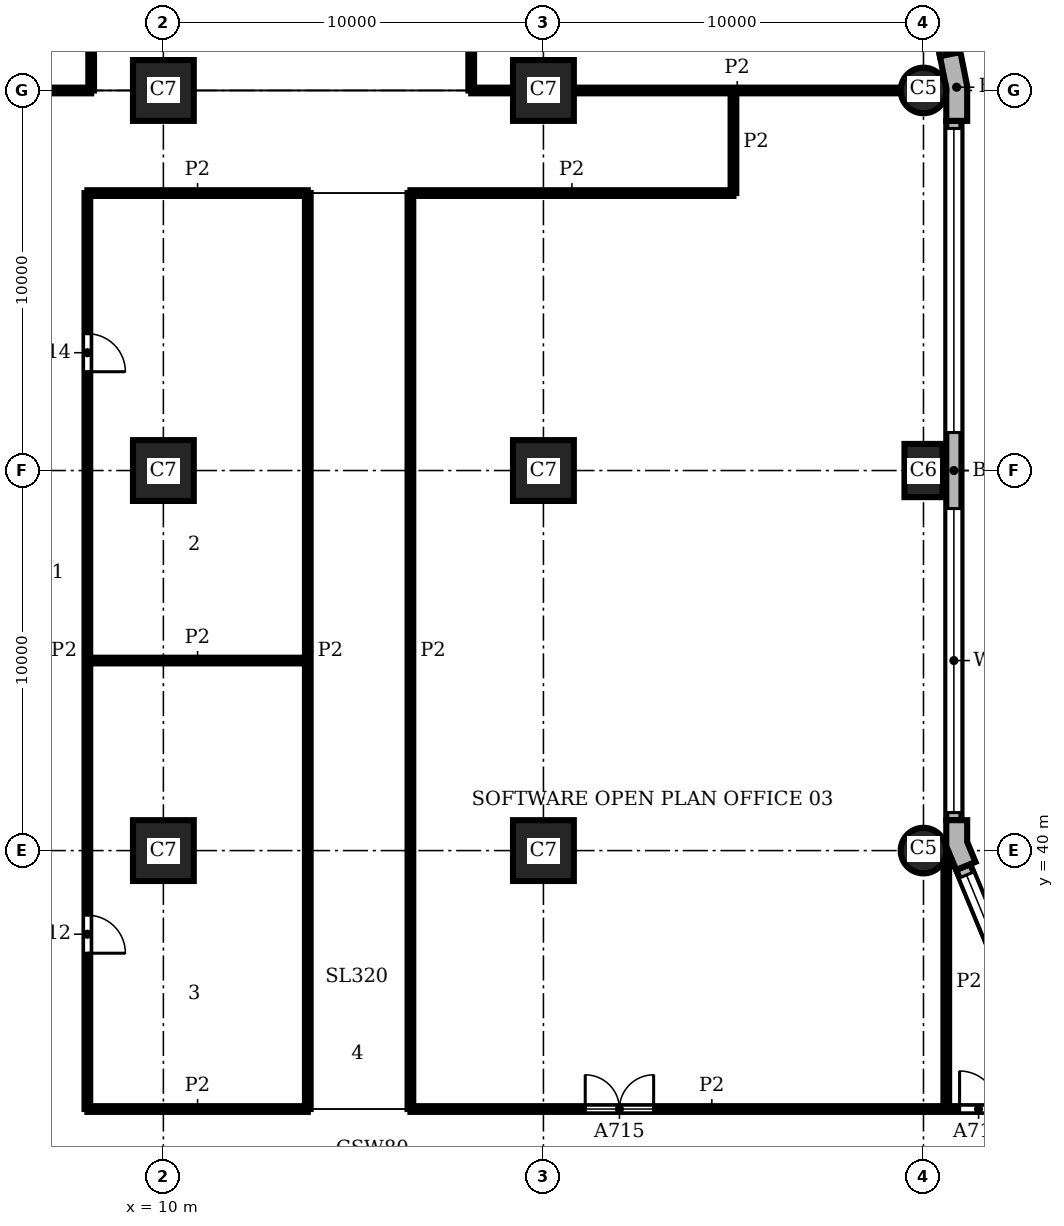
"""IFC4 building model, lengths in metres.
Left out: names, types, materials, properties, quantities, classifications, styles, units other than length and angle.
Written with IfcOpenShell. Run it as: python <this file> out.ifc"""

import sys

from ifc_helpers import new_model, si_unit, direction, frame, frame_2d, origin, origin_2d, place, context, subcontext, project, spatial, polyline, rectangle, circle, outline, extrude, element, fill, save


model = new_model("IFC4")
c1 = context("Model", 3, precision=1e-05, world=origin(), true_north=direction((0.0, 1.0)))
c2 = subcontext(c1, "Body", "Model", "MODEL_VIEW")
j1 = project(units=[si_unit("LENGTHUNIT", "METRE"), si_unit("PLANEANGLEUNIT", "RADIAN")], contexts=[c1])
p1 = place(None, origin())
s1 = spatial("IfcSite", under=j1, at=p1, CompositionType="ELEMENT")
p2 = place(p1, origin())
s2 = spatial("IfcBuilding", under=s1, at=p2, CompositionType="ELEMENT")
p3 = place(p2, frame((0.0, 0.0, 82.2)))
s3 = spatial("IfcBuildingStorey", under=s2, at=p3, CompositionType="ELEMENT", Elevation=82.2)
p4 = place(p3, frame((30.0, 40.0, 0.0), z_axis=(0.0, 0.0, 1.0), x_axis=(1.0, 0.0, 0.0)))
e1 = element("IfcColumn", 1, at=p4, inside=s3, PredefinedType="COLUMN", context=c2, shape_type="SweptSolid", body=[
    extrude(circle(Radius=0.6, at=origin_2d()), origin(), (0.0, 0.0, 1.0), 3.9),
])
p5 = place(p3, frame((30.0, 50.0, 0.0), z_axis=(0.0, 0.0, 1.0), x_axis=(0.0, 1.0, 0.0)))
e2 = element("IfcColumn", 2, at=p5, inside=s3, PredefinedType="COLUMN", context=c2, shape_type="SweptSolid", body=[
    extrude(rectangle(XDim=1.4, YDim=1.0, at=origin_2d()), origin(), (0.0, 0.0, 1.0), 3.9),
])
p6 = place(p3, frame((30.0, 60.0, 0.0), z_axis=(0.0, 0.0, 1.0), x_axis=(1.0, 0.0, 0.0)))
e3 = element("IfcColumn", 3, at=p6, inside=s3, PredefinedType="COLUMN", context=c2, shape_type="SweptSolid", body=[
    extrude(circle(Radius=0.6, at=origin_2d()), origin(), (0.0, 0.0, 1.0), 3.9),
])
for number, where, z_axis, x_axis in (
    (4, (10.0, 40.0, 0.0), (0.0, 0.0, 1.0), (1.0, 0.0, 0.0)),
    (5, (10.0, 50.0, 0.0), (0.0, 0.0, 1.0), (1.0, 0.0, 0.0)),
    (6, (10.0, 60.0, 0.0), (0.0, 0.0, 1.0), (1.0, 0.0, 0.0)),
    (7, (20.0, 40.0, 0.0), (0.0, 0.0, 1.0), (1.0, 0.0, 0.0)),
    (8, (20.0, 50.0, 0.0), (0.0, 0.0, 1.0), (1.0, 0.0, 0.0)),
    (9, (20.0, 60.0, 0.0), (0.0, 0.0, 1.0), (1.0, 0.0, 0.0)),
):
    element("IfcColumn", number, at=place(p3, frame(where, z_axis=z_axis, x_axis=x_axis)), inside=s3, PredefinedType="COLUMN", context=c2, shape_type="SweptSolid", body=[
        extrude(rectangle(XDim=1.6, YDim=1.6, at=origin_2d()), origin(), (0.0, 0.0, 1.0), 3.9),
    ])
p7 = place(p3, origin())
e10 = element("IfcWall", 10, at=p7, inside=s3, PredefinedType="SOLIDWALL", context=c2, shape_type="SweptSolid", body=[
    extrude(outline(polyline([(31.23, 39.644), (31.369, 39.701), (31.15, 40.229), (31.15, 40.8), (31.0, 40.8), (30.6, 40.8), (30.6, 40.119), (30.861, 39.49), (31.23, 39.644)])), origin(), (0.0, 0.0, 1.0), 3.9),
])
e11 = element("IfcWall", 11, at=p7, inside=s3, PredefinedType="SOLIDWALL", context=c2, shape_type="SweptSolid", body=[
    extrude(outline(polyline([(31.0, 59.2), (31.15, 59.2), (31.15, 60.113), (30.972, 61.009), (30.825, 60.98), (30.432, 60.902), (30.6, 60.059), (30.6, 59.2), (31.0, 59.2)])), origin(), (0.0, 0.0, 1.0), 3.9),
])
p8 = place(p3, frame((33.362, 33.974, 0.0), z_axis=(0.0, 0.0, 1.0), x_axis=(-0.382655745237, 0.923891000409, 0.0)))
e12 = element("IfcWall", 12, at=p8, inside=s3, PredefinedType="SOLIDWALL", context=c2, shape_type="SweptSolid", body=[
    extrude(rectangle(XDim=6.053, YDim=0.4, at=frame_2d((3.027, 0.0))), origin(), (0.0, 0.0, 1.0), 3.9),
])
p9 = place(p8, frame((0.227, 0.0, 0.9)))
e13 = element("IfcOpeningElement", 13, at=p9, cuts=e12, PredefinedType="OPENING", context=c2, shape_type="SweptSolid", body=[
    extrude(rectangle(XDim=5.6, YDim=2.35, at=frame_2d((2.8, 1.175))), frame((0.0, 0.21, 0.0), z_axis=(0.0, -1.0, 0.0), x_axis=(1.0, 0.0, 0.0)), (0.0, 0.0, 1.0), 0.42),
])
p10 = place(p3, frame((30.8, 40.8, 0.0), z_axis=(0.0, 0.0, 1.0), x_axis=(0.0, 1.0, 0.0)))
e14 = element("IfcWall", 14, at=p10, inside=s3, PredefinedType="SOLIDWALL", context=c2, shape_type="SweptSolid", body=[
    extrude(rectangle(XDim=18.4, YDim=0.4, at=frame_2d((9.2, 0.0))), origin(), (0.0, 0.0, 1.0), 3.9),
])
p11 = place(p10, frame((0.2, 0.0, 0.9)))
e15 = element("IfcOpeningElement", 15, at=p11, cuts=e14, PredefinedType="OPENING", context=c2, shape_type="SweptSolid", body=[
    extrude(rectangle(XDim=8.0, YDim=2.35, at=frame_2d((4.0, 1.175))), frame((0.0, 0.21, 0.0), z_axis=(0.0, -1.0, 0.0), x_axis=(1.0, 0.0, 0.0)), (0.0, 0.0, 1.0), 0.42),
])
p12 = place(p10, frame((10.2, 0.0, 0.9)))
e16 = element("IfcOpeningElement", 16, at=p12, cuts=e14, PredefinedType="OPENING", context=c2, shape_type="SweptSolid", body=[
    extrude(rectangle(XDim=8.0, YDim=2.35, at=frame_2d((4.0, 1.175))), frame((0.0, 0.21, 0.0), z_axis=(0.0, -1.0, 0.0), x_axis=(1.0, 0.0, 0.0)), (0.0, 0.0, 1.0), 0.42),
])
p13 = place(p3, frame((30.629, 60.941, 0.0), z_axis=(0.0, 0.0, 1.0), x_axis=(-0.195098533057, 0.98078364709, 0.0)))
e17 = element("IfcWall", 17, at=p13, inside=s3, PredefinedType="SOLIDWALL", context=c2, shape_type="SweptSolid", body=[
    extrude(rectangle(XDim=4.753, YDim=0.4, at=frame_2d((2.376, 0.0))), origin(), (0.0, 0.0, 1.0), 3.9),
])
p14 = place(p13, frame((0.226, 0.0, 0.9)))
e18 = element("IfcOpeningElement", 18, at=p14, cuts=e17, PredefinedType="OPENING", context=c2, shape_type="SweptSolid", body=[
    extrude(rectangle(XDim=4.3, YDim=2.35, at=frame_2d((2.15, 1.175))), frame((0.0, 0.21, 0.0), z_axis=(0.0, -1.0, 0.0), x_axis=(1.0, 0.0, 0.0)), (0.0, 0.0, 1.0), 0.42),
])
p15 = place(p3, frame((8.0, 33.2, 0.0), z_axis=(0.0, 0.0, 1.0), x_axis=(0.0, 1.0, 0.0)))
e19 = element("IfcWall", 19, at=p15, inside=s3, PredefinedType="PARTITIONING", context=c2, shape_type="SweptSolid", body=[
    extrude(rectangle(XDim=24.1, YDim=0.15, at=frame_2d((12.05, 0.0))), origin(), (0.0, 0.0, 1.0), 3.58),
])
p16 = place(p15, frame((4.1, 0.0, 0.0)))
e20 = element("IfcOpeningElement", 20, at=p16, cuts=e19, PredefinedType="OPENING", context=c2, shape_type="SweptSolid", body=[
    extrude(rectangle(XDim=1.0, YDim=2.1, at=frame_2d((0.5, 1.05))), frame((0.0, 0.085, 0.0), z_axis=(0.0, -1.0, 0.0), x_axis=(1.0, 0.0, 0.0)), (0.0, 0.0, 1.0), 0.17),
])
p17 = place(p15, frame((19.4, 0.0, 0.0)))
e21 = element("IfcOpeningElement", 21, at=p17, cuts=e19, PredefinedType="OPENING", context=c2, shape_type="SweptSolid", body=[
    extrude(rectangle(XDim=1.0, YDim=2.1, at=frame_2d((0.5, 1.05))), frame((0.0, 0.085, 0.0), z_axis=(0.0, -1.0, 0.0), x_axis=(1.0, 0.0, 0.0)), (0.0, 0.0, 1.0), 0.17),
])
p18 = place(p3, frame((8.1, 60.0, 0.0), z_axis=(0.0, 0.0, 1.0), x_axis=(0.0, 1.0, 0.0)))
e22 = element("IfcWall", 22, at=p18, inside=s3, PredefinedType="PARTITIONING", context=c2, shape_type="SweptSolid", body=[
    extrude(rectangle(XDim=6.4, YDim=0.15, at=frame_2d((3.2, 0.0))), origin(), (0.0, 0.0, 1.0), 3.58),
])
p19 = place(p18, frame((2.85, 0.0, 0.0)))
e23 = element("IfcOpeningElement", 23, at=p19, cuts=e22, PredefinedType="OPENING", context=c2, shape_type="SweptSolid", body=[
    extrude(rectangle(XDim=1.0, YDim=2.1, at=frame_2d((0.5, 1.05))), frame((0.0, 0.085, 0.0), z_axis=(0.0, -1.0, 0.0), x_axis=(1.0, 0.0, 0.0)), (0.0, 0.0, 1.0), 0.17),
])
for number, where, z_axis, x_axis in (
    (24, (13.8, 33.2, 0.0), (0.0, 0.0, 1.0), (0.0, 1.0, 0.0)),
    (25, (16.5, 33.2, 0.0), (0.0, 0.0, 1.0), (0.0, 1.0, 0.0)),
):
    element("IfcWall", number, at=place(p3, frame(where, z_axis=z_axis, x_axis=x_axis)), inside=s3, PredefinedType="PARTITIONING", context=c2, shape_type="SweptSolid", body=[
        extrude(rectangle(XDim=24.1, YDim=0.15, at=frame_2d((12.05, 0.0))), origin(), (0.0, 0.0, 1.0), 3.58),
    ])
p20 = place(p3, frame((18.1, 60.0, 0.0), z_axis=(0.0, 0.0, 1.0), x_axis=(0.0, 1.0, 0.0)))
e26 = element("IfcWall", 26, at=p20, inside=s3, PredefinedType="PARTITIONING", context=c2, shape_type="SweptSolid", body=[
    extrude(rectangle(XDim=6.4, YDim=0.15, at=frame_2d((3.2, 0.0))), origin(), (0.0, 0.0, 1.0), 3.58),
])
p21 = place(p20, frame((1.85, 0.0, 0.0)))
e27 = element("IfcOpeningElement", 27, at=p21, cuts=e26, PredefinedType="OPENING", context=c2, shape_type="SweptSolid", body=[
    extrude(rectangle(XDim=1.8, YDim=2.1, at=frame_2d((0.9, 1.05))), frame((0.0, 0.085, 0.0), z_axis=(0.0, -1.0, 0.0), x_axis=(1.0, 0.0, 0.0)), (0.0, 0.0, 1.0), 0.17),
])
p22 = place(p3, frame((25.0, 57.3, 0.0), z_axis=(0.0, 0.0, 1.0), x_axis=(0.0, 1.0, 0.0)))
e28 = element("IfcWall", 28, at=p22, inside=s3, PredefinedType="PARTITIONING", context=c2, shape_type="SweptSolid", body=[
    extrude(rectangle(XDim=2.7, YDim=0.15, at=frame_2d((1.35, 0.0))), origin(), (0.0, 0.0, 1.0), 3.58),
])
p23 = place(p3, frame((30.6, 33.2, 0.0), z_axis=(0.0, 0.0, 1.0), x_axis=(0.0, 1.0, 0.0)))
e29 = element("IfcWall", 29, at=p23, inside=s3, PredefinedType="PARTITIONING", context=c2, shape_type="SweptSolid", body=[
    extrude(rectangle(XDim=6.699, YDim=0.15, at=frame_2d((3.35, 0.0))), origin(), (0.0, 0.0, 1.0), 3.58),
])
p24 = place(p3, frame((8.0, 33.2, 0.0), z_axis=(0.0, 0.0, 1.0), x_axis=(1.0, 0.0, 0.0)))
e30 = element("IfcWall", 30, at=p24, inside=s3, PredefinedType="PARTITIONING", context=c2, shape_type="SweptSolid", body=[
    extrude(rectangle(XDim=5.8, YDim=0.15, at=frame_2d((2.9, 0.0))), origin(), (0.0, 0.0, 1.0), 3.58),
])
p25 = place(p3, frame((16.5, 33.2, 0.0), z_axis=(0.0, 0.0, 1.0), x_axis=(1.0, 0.0, 0.0)))
e31 = element("IfcWall", 31, at=p25, inside=s3, PredefinedType="PARTITIONING", context=c2, shape_type="SweptSolid", body=[
    extrude(rectangle(XDim=15.862, YDim=0.15, at=frame_2d((7.931, 0.0))), origin(), (0.0, 0.0, 1.0), 3.58),
])
p26 = place(p25, frame((4.6, 0.0, 0.0)))
e32 = element("IfcOpeningElement", 32, at=p26, cuts=e31, PredefinedType="OPENING", context=c2, shape_type="SweptSolid", body=[
    extrude(rectangle(XDim=1.8, YDim=2.1, at=frame_2d((0.9, 1.05))), frame((0.0, 0.085, 0.0), z_axis=(0.0, -1.0, 0.0), x_axis=(1.0, 0.0, 0.0)), (0.0, 0.0, 1.0), 0.17),
])
p27 = place(p25, frame((14.45, 0.0, 0.0)))
e33 = element("IfcOpeningElement", 33, at=p27, cuts=e31, PredefinedType="OPENING", context=c2, shape_type="SweptSolid", body=[
    extrude(rectangle(XDim=1.0, YDim=2.1, at=frame_2d((0.5, 1.05))), frame((0.0, 0.085, 0.0), z_axis=(0.0, -1.0, 0.0), x_axis=(1.0, 0.0, 0.0)), (0.0, 0.0, 1.0), 0.17),
])
for number, where, z_axis, x_axis in (
    (34, (8.0, 45.0, 0.0), (0.0, 0.0, 1.0), (1.0, 0.0, 0.0)),
    (35, (8.0, 57.3, 0.0), (0.0, 0.0, 1.0), (1.0, 0.0, 0.0)),
):
    element("IfcWall", number, at=place(p3, frame(where, z_axis=z_axis, x_axis=x_axis)), inside=s3, PredefinedType="PARTITIONING", context=c2, shape_type="SweptSolid", body=[
        extrude(rectangle(XDim=5.8, YDim=0.15, at=frame_2d((2.9, 0.0))), origin(), (0.0, 0.0, 1.0), 3.58),
    ])
p28 = place(p3, frame((16.5, 57.3, 0.0), z_axis=(0.0, 0.0, 1.0), x_axis=(1.0, 0.0, 0.0)))
e36 = element("IfcWall", 36, at=p28, inside=s3, PredefinedType="PARTITIONING", context=c2, shape_type="SweptSolid", body=[
    extrude(rectangle(XDim=8.5, YDim=0.15, at=frame_2d((4.25, 0.0))), origin(), (0.0, 0.0, 1.0), 3.58),
])
p29 = place(p3, frame((0.6, 60.0, 0.0), z_axis=(0.0, 0.0, 1.0), x_axis=(1.0, 0.0, 0.0)))
e37 = element("IfcWall", 37, at=p29, inside=s3, PredefinedType="PARTITIONING", context=c2, shape_type="SweptSolid", body=[
    extrude(rectangle(XDim=7.5, YDim=0.15, at=frame_2d((3.75, 0.0))), origin(), (0.0, 0.0, 1.0), 3.58),
])
p30 = place(p3, frame((18.1, 60.0, 0.0), z_axis=(0.0, 0.0, 1.0), x_axis=(1.0, 0.0, 0.0)))
e38 = element("IfcWall", 38, at=p30, inside=s3, PredefinedType="PARTITIONING", context=c2, shape_type="SweptSolid", body=[
    extrude(rectangle(XDim=1.1, YDim=0.15, at=frame_2d((0.55, 0.0))), origin(), (0.0, 0.0, 1.0), 3.58),
])
p31 = place(p3, frame((20.8, 60.0, 0.0), z_axis=(0.0, 0.0, 1.0), x_axis=(1.0, 0.0, 0.0)))
e39 = element("IfcWall", 39, at=p31, inside=s3, PredefinedType="PARTITIONING", context=c2, shape_type="SweptSolid", body=[
    extrude(rectangle(XDim=8.6, YDim=0.15, at=frame_2d((4.3, 0.0))), origin(), (0.0, 0.0, 1.0), 3.58),
])
p32 = place(p9, origin())
e40 = element("IfcWindow", 40, at=p32, inside=s3, PartitioningType="SINGLE_PANEL", PredefinedType="WINDOW", context=c2, shape_type="SweptSolid", body=[
    extrude(rectangle(XDim=5.6, YDim=2.35, at=frame_2d((2.8, 1.175))), frame((0.0, 0.16, 0.0), z_axis=(0.0, -1.0, 0.0), x_axis=(1.0, 0.0, 0.0)), (0.0, 0.0, 1.0), 0.06),
])
fill(e13, e40)
p33 = place(p11, origin())
e41 = element("IfcWindow", 41, at=p33, inside=s3, PartitioningType="SINGLE_PANEL", PredefinedType="WINDOW", context=c2, shape_type="SweptSolid", body=[
    extrude(rectangle(XDim=8.0, YDim=2.35, at=frame_2d((4.0, 1.175))), frame((0.0, 0.16, 0.0), z_axis=(0.0, -1.0, 0.0), x_axis=(1.0, 0.0, 0.0)), (0.0, 0.0, 1.0), 0.06),
])
fill(e15, e41)
p34 = place(p12, origin())
e42 = element("IfcWindow", 42, at=p34, inside=s3, PartitioningType="SINGLE_PANEL", PredefinedType="WINDOW", context=c2, shape_type="SweptSolid", body=[
    extrude(rectangle(XDim=8.0, YDim=2.35, at=frame_2d((4.0, 1.175))), frame((0.0, 0.16, 0.0), z_axis=(0.0, -1.0, 0.0), x_axis=(1.0, 0.0, 0.0)), (0.0, 0.0, 1.0), 0.06),
])
fill(e16, e42)
p35 = place(p16, frame((1.0, 0.0, 0.0), z_axis=(0.0, 0.0, 1.0), x_axis=(-1.0, 0.0, 0.0)))
e43 = element("IfcDoor", 43, at=p35, inside=s3, OperationType="SINGLE_SWING_RIGHT", PredefinedType="DOOR", context=c2, shape_type="SweptSolid", body=[
    extrude(rectangle(XDim=1.0, YDim=2.1, at=frame_2d((0.5, 1.05))), frame((0.0, 0.025, 0.0), z_axis=(0.0, -1.0, 0.0), x_axis=(1.0, 0.0, 0.0)), (0.0, 0.0, 1.0), 0.05),
])
fill(e20, e43)
p36 = place(p17, frame((1.0, 0.0, 0.0), z_axis=(0.0, 0.0, 1.0), x_axis=(-1.0, 0.0, 0.0)))
e44 = element("IfcDoor", 44, at=p36, inside=s3, OperationType="SINGLE_SWING_RIGHT", PredefinedType="DOOR", context=c2, shape_type="SweptSolid", body=[
    extrude(rectangle(XDim=1.0, YDim=2.1, at=frame_2d((0.5, 1.05))), frame((0.0, 0.025, 0.0), z_axis=(0.0, -1.0, 0.0), x_axis=(1.0, 0.0, 0.0)), (0.0, 0.0, 1.0), 0.05),
])
fill(e21, e44)
p37 = place(p26, origin())
e45 = element("IfcDoor", 45, at=p37, inside=s3, OperationType="DOUBLE_DOOR_SINGLE_SWING", PredefinedType="DOOR", context=c2, shape_type="SweptSolid", body=[
    extrude(rectangle(XDim=1.8, YDim=2.1, at=frame_2d((0.9, 1.05))), frame((0.0, 0.025, 0.0), z_axis=(0.0, -1.0, 0.0), x_axis=(1.0, 0.0, 0.0)), (0.0, 0.0, 1.0), 0.05),
])
fill(e32, e45)
p38 = place(p27, origin())
e46 = element("IfcDoor", 46, at=p38, inside=s3, OperationType="SINGLE_SWING_LEFT", PredefinedType="DOOR", context=c2, shape_type="SweptSolid", body=[
    extrude(rectangle(XDim=1.0, YDim=2.1, at=frame_2d((0.5, 1.05))), frame((0.0, 0.025, 0.0), z_axis=(0.0, -1.0, 0.0), x_axis=(1.0, 0.0, 0.0)), (0.0, 0.0, 1.0), 0.05),
])
fill(e33, e46)
save(model, sys.argv[1])
